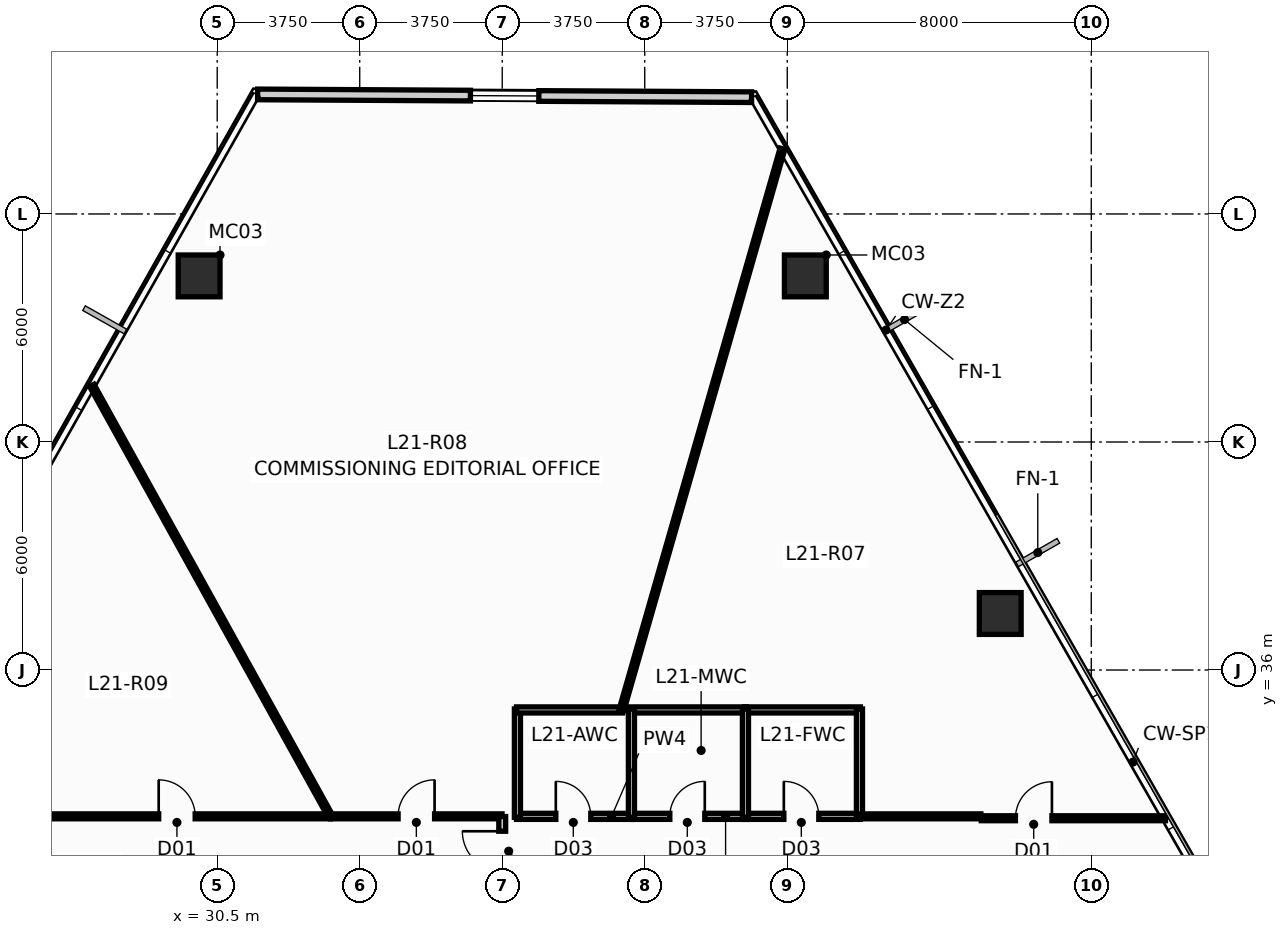
"""IFC4 building model, lengths in metres.
Left out: names, types, materials, properties, quantities, classifications, styles, units other than length and angle.
Written with IfcOpenShell. Run it as: python <this file> out.ifc"""

import sys

from ifc_helpers import new_model, si_unit, direction, frame, frame_2d, origin, origin_2d, place, context, subcontext, project, spatial, rectangle, hollow_rectangle, extrude, source, transform, mapped, element, fill, save


model = new_model("IFC4")
c1 = context("Model", 3, precision=1e-05, world=origin(), true_north=direction((0.0, 1.0)))
c2 = subcontext(c1, "Body", "Model", "MODEL_VIEW")
j1 = project(units=[si_unit("LENGTHUNIT", "METRE"), si_unit("PLANEANGLEUNIT", "RADIAN")], contexts=[c1])
p1 = place(None, origin())
s1 = spatial("IfcSite", under=j1, at=p1, CompositionType="ELEMENT")
p2 = place(p1, origin())
s2 = spatial("IfcBuilding", under=s1, at=p2, CompositionType="ELEMENT")
p3 = place(p2, frame((0.0, 0.0, 83.5)))
s3 = spatial("IfcBuildingStorey", under=s2, at=p3, CompositionType="ELEMENT", Elevation=83.5)
m1 = source(origin(), c2, "Body", "SweptSolid", [
    extrude(hollow_rectangle(XDim=1.1, YDim=1.1, WallThickness=0.06, at=origin_2d()), origin(), (0.0, 0.0, 1.0), 3.651),
])
for number, where, z_axis, x_axis in (
    (1, (45.976, 46.37, 0.0), (-0.024, 0.002, 1.0), (-0.072, -0.997, 0.0)),
    (2, (30.024, 46.37, 0.0), (0.024, 0.002, 1.0), (-0.072, 0.997, 0.0)),
):
    element("IfcColumn", number, at=place(p3, frame(where, z_axis=z_axis, x_axis=x_axis)), inside=s3, PredefinedType="COLUMN", context=c2, shape_type="MappedRepresentation", body=[
        mapped(m1, transform((0.0, 0.0, 0.0), scale=1.0)),
    ])
m2 = source(origin(), c2, "Body", "SweptSolid", [
    extrude(hollow_rectangle(XDim=1.1, YDim=1.1, WallThickness=0.06, at=origin_2d()), origin(), (0.0, 0.0, 1.0), 3.651),
])
p4 = place(p3, frame((51.104, 37.488, 0.0), z_axis=(-0.019393993486, -0.006018825565, 0.999793802119), x_axis=(0.296399214872, -0.955064136811, 0.0)))
e3 = element("IfcColumn", 3, at=p4, inside=s3, PredefinedType="COLUMN", context=c2, shape_type="MappedRepresentation", body=[
    mapped(m2, transform((0.0, 0.0, 0.0), scale=1.0)),
])
p5 = place(p3, frame((31.563, 51.146, 0.0), z_axis=(0.0, 0.0, 1.0), x_axis=(0.999984442801, -0.005578006527, 0.0)))
e4 = element("IfcWall", 4, at=p5, inside=s3, PredefinedType="STANDARD", context=c2, shape_type="SweptSolid", body=[
    extrude(rectangle(XDim=12.999, YDim=0.28, at=frame_2d((6.5, 0.0))), origin(), (0.0, 0.0, 1.0), 3.4),
])
p6 = place(p5, frame((5.6, 0.0, 0.9)))
e5 = element("IfcOpeningElement", 5, at=p6, cuts=e4, PredefinedType="OPENING", context=c2, shape_type="SweptSolid", body=[
    extrude(rectangle(XDim=1.8, YDim=1.8, at=frame_2d((0.9, 0.9))), frame((0.0, 0.152, 0.0), z_axis=(0.0, -1.0, 0.0), x_axis=(1.0, 0.0, 0.0)), (0.0, 0.0, 1.0), 0.304),
])
p7 = place(p3, frame((38.375, 32.15, 0.0), z_axis=(0.0, 0.0, 1.0), x_axis=(1.0, 0.0, 0.0)))
e6 = element("IfcWall", 6, at=p7, inside=s3, PredefinedType="PLUMBINGWALL", context=c2, shape_type="SweptSolid", body=[
    extrude(rectangle(XDim=3.05, YDim=0.16, at=frame_2d((1.525, 0.0))), origin(), (0.0, 0.0, 1.0), 3.4),
])
p8 = place(p7, frame((1.035, 0.0, 0.0)))
e7 = element("IfcOpeningElement", 7, at=p8, cuts=e6, PredefinedType="OPENING", context=c2, shape_type="SweptSolid", body=[
    extrude(rectangle(XDim=0.92, YDim=2.1, at=frame_2d((0.46, 1.05))), frame((0.0, 0.092, 0.0), z_axis=(0.0, -1.0, 0.0), x_axis=(1.0, 0.0, 0.0)), (0.0, 0.0, 1.0), 0.184),
])
p9 = place(p3, frame((41.375, 32.15, 0.0), z_axis=(0.0, 0.0, 1.0), x_axis=(1.0, 0.0, 0.0)))
e8 = element("IfcWall", 8, at=p9, inside=s3, PredefinedType="PLUMBINGWALL", context=c2, shape_type="SweptSolid", body=[
    extrude(rectangle(XDim=3.05, YDim=0.16, at=frame_2d((1.525, 0.0))), origin(), (0.0, 0.0, 1.0), 3.4),
])
p10 = place(p9, frame((1.035, 0.0, 0.0)))
e9 = element("IfcOpeningElement", 9, at=p10, cuts=e8, PredefinedType="OPENING", context=c2, shape_type="SweptSolid", body=[
    extrude(rectangle(XDim=0.92, YDim=2.1, at=frame_2d((0.46, 1.05))), frame((0.0, 0.092, 0.0), z_axis=(0.0, -1.0, 0.0), x_axis=(1.0, 0.0, 0.0)), (0.0, 0.0, 1.0), 0.184),
])
p11 = place(p3, frame((44.375, 32.15, 0.0), z_axis=(0.0, 0.0, 1.0), x_axis=(1.0, 0.0, 0.0)))
e10 = element("IfcWall", 10, at=p11, inside=s3, PredefinedType="PLUMBINGWALL", context=c2, shape_type="SweptSolid", body=[
    extrude(rectangle(XDim=3.05, YDim=0.16, at=frame_2d((1.525, 0.0))), origin(), (0.0, 0.0, 1.0), 3.4),
])
p12 = place(p11, frame((1.035, 0.0, 0.0)))
e11 = element("IfcOpeningElement", 11, at=p12, cuts=e10, PredefinedType="OPENING", context=c2, shape_type="SweptSolid", body=[
    extrude(rectangle(XDim=0.92, YDim=2.1, at=frame_2d((0.46, 1.05))), frame((0.0, 0.092, 0.0), z_axis=(0.0, -1.0, 0.0), x_axis=(1.0, 0.0, 0.0)), (0.0, 0.0, 1.0), 0.184),
])
for number, where, z_axis, x_axis in (
    (12, (41.375, 34.95, 0.0), (0.0, 0.0, 1.0), (1.0, 0.0, 0.0)),
    (13, (47.425, 34.95, 0.0), (0.0, 0.0, 1.0), (-1.0, 0.0, 0.0)),
):
    element("IfcWall", number, at=place(p3, frame(where, z_axis=z_axis, x_axis=x_axis)), inside=s3, PredefinedType="PLUMBINGWALL", context=c2, shape_type="SweptSolid", body=[
        extrude(rectangle(XDim=3.05, YDim=0.16, at=frame_2d((1.525, 0.0))), origin(), (0.0, 0.0, 1.0), 3.026),
    ])
for number, where, z_axis, x_axis in (
    (14, (41.4, 32.125, 0.0), (0.0, 0.0, 1.0), (0.0, 1.0, 0.0)),
    (15, (38.4, 32.125, 0.0), (0.0, 0.0, 1.0), (0.0, 1.0, 0.0)),
    (16, (44.4, 32.125, 0.0), (0.0, 0.0, 1.0), (0.0, 1.0, 0.0)),
    (17, (47.4, 32.125, 0.0), (0.0, 0.0, 1.0), (0.0, 1.0, 0.0)),
):
    element("IfcWall", number, at=place(p3, frame(where, z_axis=z_axis, x_axis=x_axis)), inside=s3, PredefinedType="PLUMBINGWALL", context=c2, shape_type="SweptSolid", body=[
        extrude(rectangle(XDim=2.85, YDim=0.16, at=frame_2d((1.425, 0.0))), origin(), (0.0, 0.0, 1.0), 3.4),
    ])
p13 = place(p3, frame((38.375, 34.95, 0.0), z_axis=(0.0, 0.0, 1.0), x_axis=(1.0, 0.0, 0.0)))
e18 = element("IfcWall", 18, at=p13, inside=s3, PredefinedType="PLUMBINGWALL", context=c2, shape_type="SweptSolid", body=[
    extrude(rectangle(XDim=2.79, YDim=0.16, at=frame_2d((1.395, 0.0))), origin(), (0.0, 0.0, 1.0), 3.026),
])
p14 = place(p3, frame((41.141, 34.955, 0.0), z_axis=(0.0, 0.0, 1.0), x_axis=(0.27567644494, 0.961250486453, 0.0)))
e19 = element("IfcWall", 19, at=p14, inside=s3, PredefinedType="PARTITIONING", context=c2, shape_type="SweptSolid", body=[
    extrude(rectangle(XDim=15.355, YDim=0.13, at=frame_2d((7.678, 0.0))), origin(), (0.0, 0.0, 1.0), 3.4),
])
p15 = place(p3, frame((27.202, 43.487, 0.0), z_axis=(0.0, 0.0, 1.0), x_axis=(0.484485627927, -0.874799220583, 0.0)))
e20 = element("IfcWall", 20, at=p15, inside=s3, PredefinedType="PARTITIONING", context=c2, shape_type="SweptSolid", body=[
    extrude(rectangle(XDim=12.955, YDim=0.13, at=frame_2d((6.477, 0.0))), origin(), (0.0, 0.0, 1.0), 3.4),
])
p16 = place(p3, frame((25.405, 32.15, 0.0), z_axis=(0.0, 0.0, 1.0), x_axis=(1.0, 0.0, 0.0)))
e21 = element("IfcWall", 21, at=p16, inside=s3, PredefinedType="PARTITIONING", context=c2, shape_type="SweptSolid", body=[
    extrude(rectangle(XDim=8.07, YDim=0.13, at=frame_2d((4.035, 0.0))), origin(), (0.0, 0.0, 1.0), 3.4),
])
p17 = place(p16, frame((3.555, 0.0, 0.0)))
e22 = element("IfcOpeningElement", 22, at=p17, cuts=e21, PredefinedType="OPENING", context=c2, shape_type="SweptSolid", body=[
    extrude(rectangle(XDim=0.96, YDim=2.15, at=frame_2d((0.48, 1.075))), frame((0.0, 0.077, 0.0), z_axis=(0.0, -1.0, 0.0), x_axis=(1.0, 0.0, 0.0)), (0.0, 0.0, 1.0), 0.154),
])
p18 = place(p3, frame((50.605, 32.1, 0.0), z_axis=(0.0, 0.0, 1.0), x_axis=(1.0, 0.0, 0.0)))
e23 = element("IfcWall", 23, at=p18, inside=s3, PredefinedType="PARTITIONING", context=c2, shape_type="SweptSolid", body=[
    extrude(rectangle(XDim=4.847, YDim=0.13, at=frame_2d((2.424, 0.0))), origin(), (0.0, 0.0, 1.0), 3.4),
])
p19 = place(p18, frame((0.9, 0.0, 0.0)))
e24 = element("IfcOpeningElement", 24, at=p19, cuts=e23, PredefinedType="OPENING", context=c2, shape_type="SweptSolid", body=[
    extrude(rectangle(XDim=0.96, YDim=2.15, at=frame_2d((0.48, 1.075))), frame((0.0, 0.077, 0.0), z_axis=(0.0, -1.0, 0.0), x_axis=(1.0, 0.0, 0.0)), (0.0, 0.0, 1.0), 0.154),
])
p20 = place(p3, frame((33.485, 32.15, 0.0), z_axis=(0.0, 0.0, 1.0), x_axis=(1.0, 0.0, 0.0)))
e25 = element("IfcWall", 25, at=p20, inside=s3, PredefinedType="PARTITIONING", context=c2, shape_type="SweptSolid", body=[
    extrude(rectangle(XDim=4.51, YDim=0.13, at=frame_2d((2.255, 0.0))), origin(), (0.0, 0.0, 1.0), 3.4),
])
p21 = place(p20, frame((1.775, 0.0, 0.0)))
e26 = element("IfcOpeningElement", 26, at=p21, cuts=e25, PredefinedType="OPENING", context=c2, shape_type="SweptSolid", body=[
    extrude(rectangle(XDim=0.96, YDim=2.15, at=frame_2d((0.48, 1.075))), frame((0.0, 0.077, 0.0), z_axis=(0.0, -1.0, 0.0), x_axis=(1.0, 0.0, 0.0)), (0.0, 0.0, 1.0), 0.154),
])
p22 = place(p3, frame((47.405, 32.15, 0.0), z_axis=(0.0, 0.0, 1.0), x_axis=(1.0, 0.0, 0.0)))
e27 = element("IfcWall", 27, at=p22, inside=s3, PredefinedType="PARTITIONING", context=c2, shape_type="SweptSolid", body=[
    extrude(rectangle(XDim=3.19, YDim=0.13, at=frame_2d((1.595, 0.0))), origin(), (0.0, 0.0, 1.0), 3.4),
])
p23 = place(p3, frame((38.0, 30.32, 0.0), z_axis=(0.0, 0.0, 1.0), x_axis=(0.0, 1.0, 0.0)))
e28 = element("IfcWall", 28, at=p23, inside=s3, PredefinedType="PARTITIONING", context=c2, shape_type="SweptSolid", body=[
    extrude(rectangle(XDim=1.825, YDim=0.18, at=frame_2d((0.913, 0.0))), origin(), (0.0, 0.0, 1.0), 3.4),
])
p24 = place(p23, frame((0.388, 0.0, 0.0)))
e29 = element("IfcOpeningElement", 29, at=p24, cuts=e28, PredefinedType="OPENING", context=c2, shape_type="SweptSolid", body=[
    extrude(rectangle(XDim=1.05, YDim=2.15, at=frame_2d((0.525, 1.075))), frame((0.0, 0.102, 0.0), z_axis=(0.0, -1.0, 0.0), x_axis=(1.0, 0.0, 0.0)), (0.0, 0.0, 1.0), 0.204),
])
p25 = place(p6, origin())
e30 = element("IfcWindow", 30, at=p25, inside=s3, PartitioningType="SINGLE_PANEL", PredefinedType="WINDOW", context=c2, shape_type="SweptSolid", body=[
    extrude(rectangle(XDim=1.8, YDim=1.8, at=frame_2d((0.9, 0.9))), frame((0.0, 0.03, 0.0), z_axis=(0.0, -1.0, 0.0), x_axis=(1.0, 0.0, 0.0)), (0.0, 0.0, 1.0), 0.06),
])
fill(e5, e30)
p26 = place(p8, origin())
e31 = element("IfcDoor", 31, at=p26, inside=s3, OperationType="SINGLE_SWING_LEFT", PredefinedType="DOOR", context=c2, shape_type="SweptSolid", body=[
    extrude(rectangle(XDim=0.92, YDim=2.1, at=frame_2d((0.46, 1.05))), frame((0.0, 0.025, 0.0), z_axis=(0.0, -1.0, 0.0), x_axis=(1.0, 0.0, 0.0)), (0.0, 0.0, 1.0), 0.05),
])
fill(e7, e31)
p27 = place(p10, origin())
e32 = element("IfcDoor", 32, at=p27, inside=s3, OperationType="SINGLE_SWING_RIGHT", PredefinedType="DOOR", context=c2, shape_type="SweptSolid", body=[
    extrude(rectangle(XDim=0.92, YDim=2.1, at=frame_2d((0.46, 1.05))), frame((0.0, 0.025, 0.0), z_axis=(0.0, -1.0, 0.0), x_axis=(1.0, 0.0, 0.0)), (0.0, 0.0, 1.0), 0.05),
])
fill(e9, e32)
p28 = place(p12, origin())
e33 = element("IfcDoor", 33, at=p28, inside=s3, OperationType="SINGLE_SWING_LEFT", PredefinedType="DOOR", context=c2, shape_type="SweptSolid", body=[
    extrude(rectangle(XDim=0.92, YDim=2.1, at=frame_2d((0.46, 1.05))), frame((0.0, 0.025, 0.0), z_axis=(0.0, -1.0, 0.0), x_axis=(1.0, 0.0, 0.0)), (0.0, 0.0, 1.0), 0.05),
])
fill(e11, e33)
p29 = place(p17, origin())
e34 = element("IfcDoor", 34, at=p29, inside=s3, OperationType="SINGLE_SWING_LEFT", PredefinedType="DOOR", context=c2, shape_type="SweptSolid", body=[
    extrude(rectangle(XDim=0.96, YDim=2.15, at=frame_2d((0.48, 1.075))), frame((0.0, 0.025, 0.0), z_axis=(0.0, -1.0, 0.0), x_axis=(1.0, 0.0, 0.0)), (0.0, 0.0, 1.0), 0.05),
])
fill(e22, e34)
p30 = place(p19, origin())
e35 = element("IfcDoor", 35, at=p30, inside=s3, OperationType="SINGLE_SWING_RIGHT", PredefinedType="DOOR", context=c2, shape_type="SweptSolid", body=[
    extrude(rectangle(XDim=0.96, YDim=2.15, at=frame_2d((0.48, 1.075))), frame((0.0, 0.025, 0.0), z_axis=(0.0, -1.0, 0.0), x_axis=(1.0, 0.0, 0.0)), (0.0, 0.0, 1.0), 0.05),
])
fill(e24, e35)
p31 = place(p21, origin())
e36 = element("IfcDoor", 36, at=p31, inside=s3, OperationType="SINGLE_SWING_RIGHT", PredefinedType="DOOR", context=c2, shape_type="SweptSolid", body=[
    extrude(rectangle(XDim=0.96, YDim=2.15, at=frame_2d((0.48, 1.075))), frame((0.0, 0.025, 0.0), z_axis=(0.0, -1.0, 0.0), x_axis=(1.0, 0.0, 0.0)), (0.0, 0.0, 1.0), 0.05),
])
fill(e26, e36)
p32 = place(p24, origin())
e37 = element("IfcDoor", 37, at=p32, inside=s3, OperationType="SINGLE_SWING_RIGHT", PredefinedType="DOOR", context=c2, shape_type="SweptSolid", body=[
    extrude(rectangle(XDim=1.05, YDim=2.15, at=frame_2d((0.525, 1.075))), frame((0.0, 0.025, 0.0), z_axis=(0.0, -1.0, 0.0), x_axis=(1.0, 0.0, 0.0)), (0.0, 0.0, 1.0), 0.05),
])
fill(e29, e37)
save(model, sys.argv[1])
